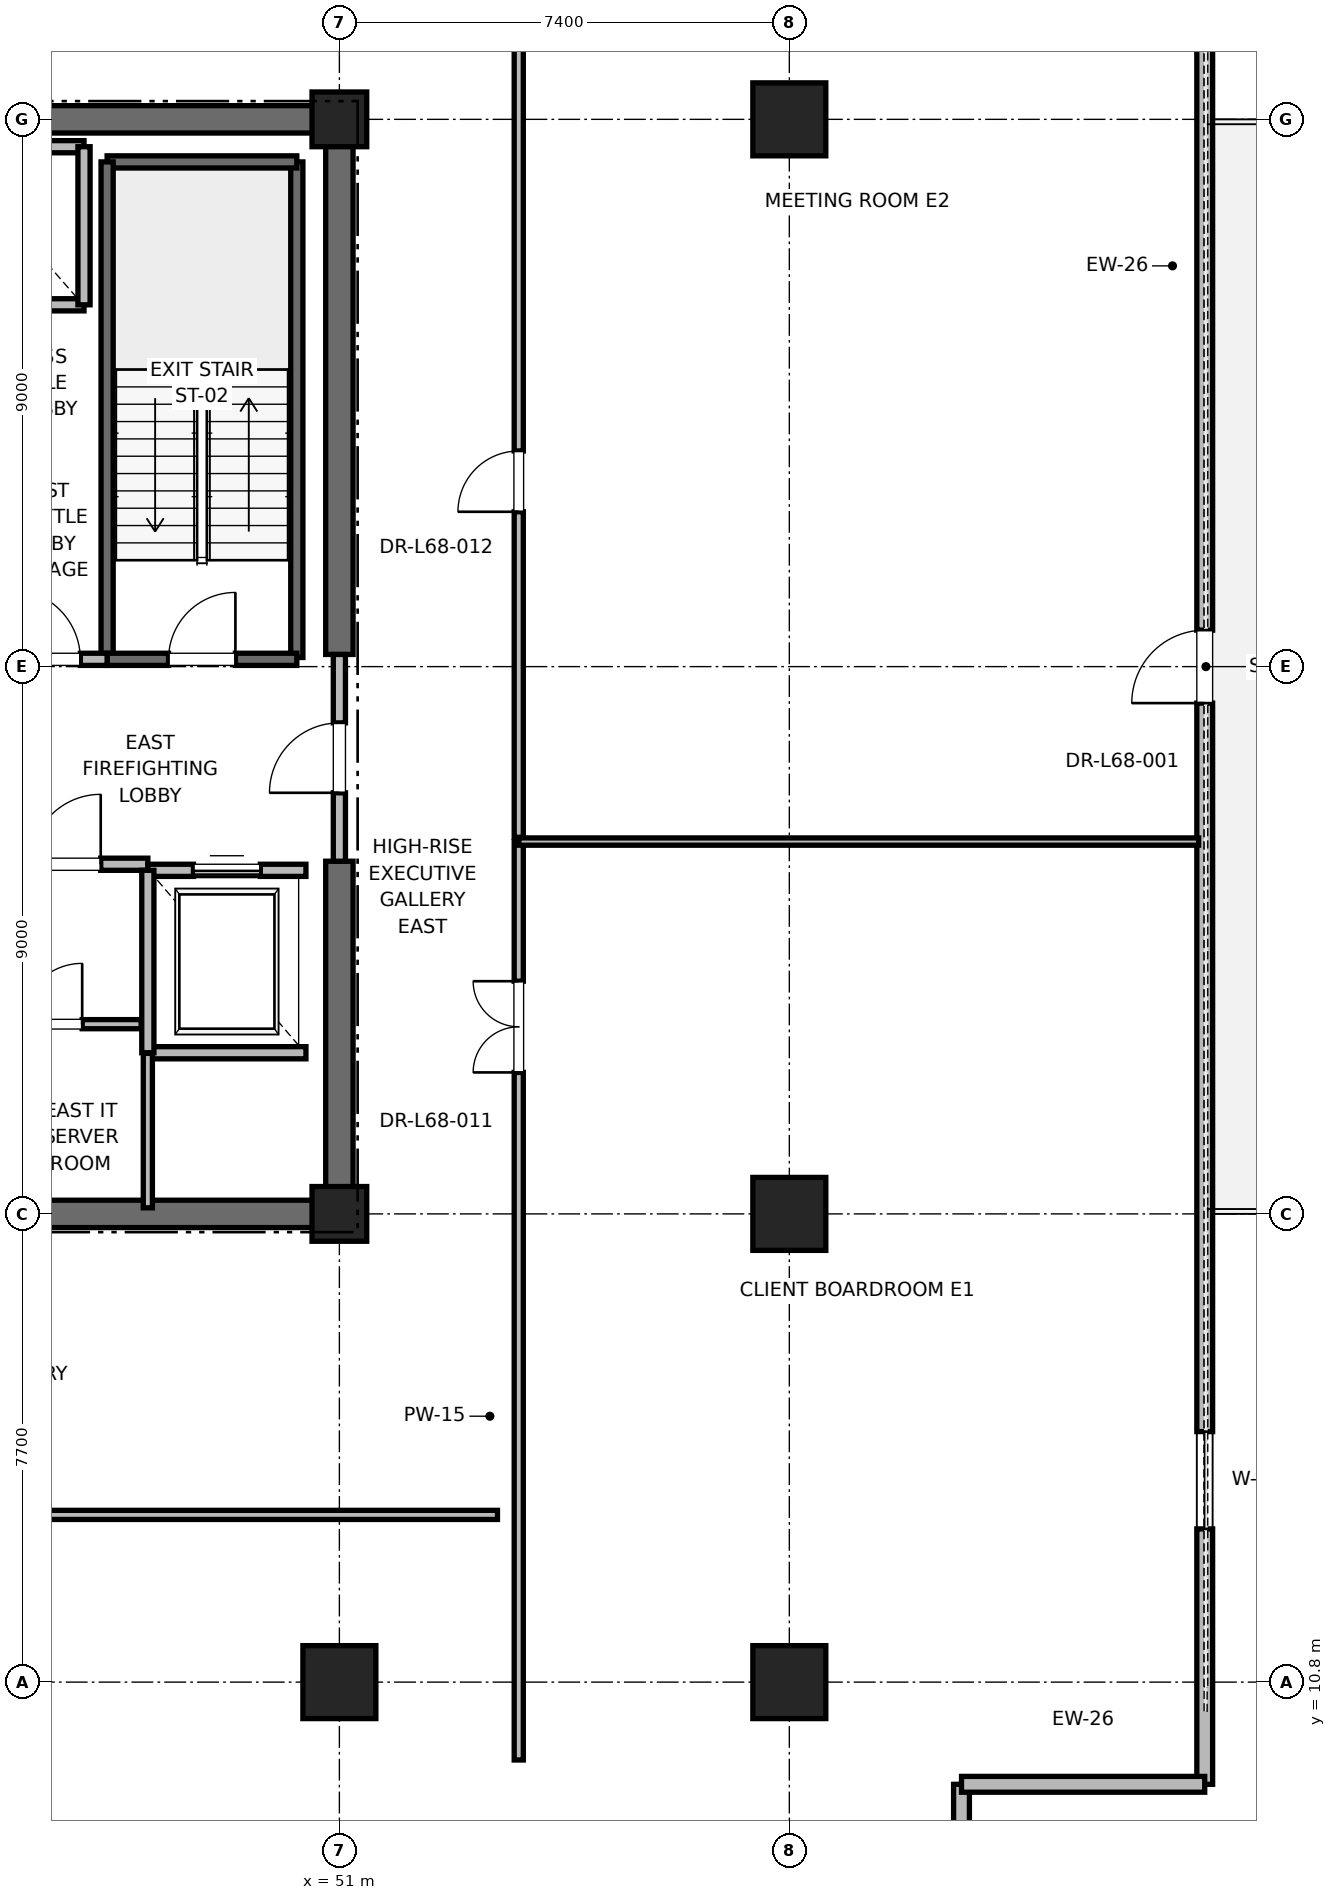
"""IFC4 building model, lengths in metres.
Left out: names, types, materials, properties, quantities, classifications, styles, units other than length and angle.
Written with IfcOpenShell. Run it as: python <this file> out.ifc"""

import sys

from ifc_helpers import new_model, si_unit, direction, frame, frame_2d, origin, origin_2d, place, context, subcontext, project, spatial, rectangle, extrude, element, fill, save


model = new_model("IFC4")
c1 = context("Model", 3, precision=1e-05, world=origin(), true_north=direction((0.0, 1.0)))
c2 = subcontext(c1, "Body", "Model", "MODEL_VIEW")
j1 = project(units=[si_unit("LENGTHUNIT", "METRE"), si_unit("PLANEANGLEUNIT", "RADIAN")], contexts=[c1])
p1 = place(None, origin())
s1 = spatial("IfcSite", under=j1, at=p1, CompositionType="ELEMENT")
p2 = place(p1, origin())
s2 = spatial("IfcBuilding", under=s1, at=p2, CompositionType="ELEMENT")
p3 = place(p2, frame((0.0, 0.0, 291.2)))
s3 = spatial("IfcBuildingStorey", under=s2, at=p3, CompositionType="ELEMENT", Elevation=291.2)
for number, where, z_axis, x_axis in (
    (1, (51.0, 10.8, 0.0), (0.0, 0.0, 1.0), (1.0, 0.0, 0.0)),
    (2, (58.4, 18.5, 0.0), (0.0, 0.0, 1.0), (1.0, 0.0, 0.0)),
    (3, (58.4, 36.5, 0.0), (0.0, 0.0, 1.0), (1.0, 0.0, 0.0)),
    (4, (58.4, 10.8, 0.0), (0.0, 0.0, 1.0), (1.0, 0.0, 0.0)),
):
    element("IfcColumn", number, at=place(p3, frame(where, z_axis=z_axis, x_axis=x_axis)), inside=s3, PredefinedType="COLUMN", context=c2, shape_type="SweptSolid", body=[
        extrude(rectangle(XDim=1.2, YDim=1.2, at=origin_2d()), origin(), (0.0, 0.0, 1.0), 4.0),
    ])
for number, where, z_axis, x_axis in (
    (5, (51.0, 18.5, 0.0), (0.0, 0.0, 1.0), (1.0, 0.0, 0.0)),
    (6, (51.0, 36.5, 0.0), (0.0, 0.0, 1.0), (1.0, 0.0, 0.0)),
):
    element("IfcColumn", number, at=place(p3, frame(where, z_axis=z_axis, x_axis=x_axis)), inside=s3, PredefinedType="PILASTER", context=c2, shape_type="SweptSolid", body=[
        extrude(rectangle(XDim=0.9, YDim=0.9, at=origin_2d()), origin(), (0.0, 0.0, 1.0), 4.0),
    ])
p4 = place(p3, frame((41.8, 18.5, 0.0), z_axis=(0.0, 0.0, 1.0), x_axis=(1.0, 0.0, 0.0)))
e7 = element("IfcWall", 7, at=p4, inside=s3, PredefinedType="SHEAR", context=c2, shape_type="SweptSolid", body=[
    extrude(rectangle(XDim=9.2, YDim=0.45, at=frame_2d((4.6, 0.0))), origin(), (0.0, 0.0, 1.0), 3.7),
])
for number, where, z_axis, x_axis in (
    (8, (45.2, 36.5, 0.0), (0.0, 0.0, 1.0), (1.0, 0.0, 0.0)),
    (9, (51.0, 18.5, 0.0), (0.0, 0.0, 1.0), (0.0, 1.0, 0.0)),
):
    element("IfcWall", number, at=place(p3, frame(where, z_axis=z_axis, x_axis=x_axis)), inside=s3, PredefinedType="SHEAR", context=c2, shape_type="SweptSolid", body=[
        extrude(rectangle(XDim=5.8, YDim=0.45, at=frame_2d((2.9, 0.0))), origin(), (0.0, 0.0, 1.0), 3.7),
    ])
p5 = place(p3, frame((51.0, 27.7, 0.0), z_axis=(0.0, 0.0, 1.0), x_axis=(0.0, 1.0, 0.0)))
e10 = element("IfcWall", 10, at=p5, inside=s3, PredefinedType="SHEAR", context=c2, shape_type="SweptSolid", body=[
    extrude(rectangle(XDim=8.8, YDim=0.45, at=frame_2d((4.4, 0.0))), origin(), (0.0, 0.0, 1.0), 3.7),
])
p6 = place(p3, frame((65.232, 9.119, 0.0), z_axis=(0.0, 0.0, 1.0), x_axis=(0.0, 1.0, 0.0)))
e11 = element("IfcWall", 11, at=p6, inside=s3, PredefinedType="PARAPET", context=c2, shape_type="SweptSolid", body=[
    extrude(rectangle(XDim=36.761, YDim=0.26, at=frame_2d((18.381, 0.0))), origin(), (0.0, 0.0, 1.0), 2.753),
])
p7 = place(p6, frame((4.2, 0.0, 0.85)))
e12 = element("IfcOpeningElement", 12, at=p7, cuts=e11, PredefinedType="OPENING", context=c2, shape_type="SweptSolid", body=[
    extrude(rectangle(XDim=1.6, YDim=2.1, at=frame_2d((0.8, 1.05))), frame((0.0, 0.13, 0.0), z_axis=(0.0, -1.0, 0.0), x_axis=(1.0, 0.0, 0.0)), (0.0, 0.0, 1.0), 0.26),
])
p8 = place(p6, frame((17.781, 0.0, 0.0)))
e13 = element("IfcOpeningElement", 13, at=p8, cuts=e11, PredefinedType="OPENING", context=c2, shape_type="SweptSolid", body=[
    extrude(rectangle(XDim=1.2, YDim=2.2, at=frame_2d((0.6, 1.1))), frame((0.0, 0.13, 0.0), z_axis=(0.0, -1.0, 0.0), x_axis=(1.0, 0.0, 0.0)), (0.0, 0.0, 1.0), 0.26),
])
p9 = place(p6, frame((30.961, 0.0, 0.85)))
e14 = element("IfcOpeningElement", 14, at=p9, cuts=e11, PredefinedType="OPENING", context=c2, shape_type="SweptSolid", body=[
    extrude(rectangle(XDim=1.6, YDim=2.1, at=frame_2d((0.8, 1.05))), frame((0.0, 0.13, 0.0), z_axis=(0.0, -1.0, 0.0), x_axis=(1.0, 0.0, 0.0)), (0.0, 0.0, 1.0), 0.26),
])
p10 = place(p3, frame((61.232, 5.619, 0.0), z_axis=(0.0, 0.0, 1.0), x_axis=(0.0, 1.0, 0.0)))
e15 = element("IfcWall", 15, at=p10, inside=s3, PredefinedType="PARAPET", context=c2, shape_type="SweptSolid", body=[
    extrude(rectangle(XDim=3.5, YDim=0.26, at=frame_2d((1.75, 0.0))), origin(), (0.0, 0.0, 1.0), 3.7),
])
p11 = place(p10, frame((0.85, 0.0, 0.85)))
e16 = element("IfcOpeningElement", 16, at=p11, cuts=e15, PredefinedType="OPENING", context=c2, shape_type="SweptSolid", body=[
    extrude(rectangle(XDim=1.8, YDim=2.2, at=frame_2d((0.9, 1.1))), frame((0.0, 0.13, 0.0), z_axis=(0.0, -1.0, 0.0), x_axis=(1.0, 0.0, 0.0)), (0.0, 0.0, 1.0), 0.26),
])
p12 = place(p3, frame((61.232, 9.119, 0.0), z_axis=(0.0, 0.0, 1.0), x_axis=(1.0, 0.0, 0.0)))
e17 = element("IfcWall", 17, at=p12, inside=s3, PredefinedType="PARAPET", context=c2, shape_type="SweptSolid", body=[
    extrude(rectangle(XDim=4.0, YDim=0.26, at=frame_2d((2.0, 0.0))), origin(), (0.0, 0.0, 1.0), 3.7),
])
p13 = place(p3, frame((50.3, 27.65, 0.0), z_axis=(0.0, 0.0, 1.0), x_axis=(0.0, 1.0, 0.0)))
e18 = element("IfcWall", 18, at=p13, inside=s3, PredefinedType="SOLIDWALL", context=c2, shape_type="SweptSolid", body=[
    extrude(rectangle(XDim=8.15, YDim=0.2, at=frame_2d((4.075, 0.0))), origin(), (0.0, 0.0, 1.0), 3.7),
])
p14 = place(p3, frame((47.18, 35.8, 0.0), z_axis=(0.0, 0.0, 1.0), x_axis=(1.0, 0.0, 0.0)))
e19 = element("IfcWall", 19, at=p14, inside=s3, PredefinedType="SOLIDWALL", context=c2, shape_type="SweptSolid", body=[
    extrude(rectangle(XDim=3.12, YDim=0.2, at=frame_2d((1.56, 0.0))), origin(), (0.0, 0.0, 1.0), 3.7),
])
p15 = place(p3, frame((47.18, 27.62, 0.0), z_axis=(0.0, 0.0, 1.0), x_axis=(0.0, 1.0, 0.0)))
e20 = element("IfcWall", 20, at=p15, inside=s3, PredefinedType="SOLIDWALL", context=c2, shape_type="SweptSolid", body=[
    extrude(rectangle(XDim=8.18, YDim=0.2, at=frame_2d((4.09, 0.0))), origin(), (0.0, 0.0, 1.0), 3.7),
])
p16 = place(p3, frame((47.18, 27.62, 0.0), z_axis=(0.0, 0.0, 1.0), x_axis=(1.0, 0.0, 0.0)))
e21 = element("IfcWall", 21, at=p16, inside=s3, PredefinedType="SOLIDWALL", context=c2, shape_type="SweptSolid", body=[
    extrude(rectangle(XDim=3.12, YDim=0.2, at=frame_2d((1.56, 0.0))), origin(), (0.0, 0.0, 1.0), 3.7),
])
p17 = place(p16, frame((1.01, 0.0, 0.0)))
e22 = element("IfcOpeningElement", 22, at=p17, cuts=e21, PredefinedType="OPENING", context=c2, shape_type="SweptSolid", body=[
    extrude(rectangle(XDim=1.1, YDim=2.15, at=frame_2d((0.55, 1.075))), frame((0.0, 0.1, 0.0), z_axis=(0.0, -1.0, 0.0), x_axis=(1.0, 0.0, 0.0)), (0.0, 0.0, 1.0), 0.2),
])
p18 = place(p3, frame((45.15, 24.25, 0.0), z_axis=(0.0, 0.0, 1.0), x_axis=(1.0, 0.0, 0.0)))
e23 = element("IfcWall", 23, at=p18, inside=s3, PredefinedType="PARTITIONING", context=c2, shape_type="SweptSolid", body=[
    extrude(rectangle(XDim=2.7, YDim=0.2, at=frame_2d((1.35, 0.0))), origin(), (0.0, 0.0, 1.0), 3.7),
])
p19 = place(p18, frame((0.775, 0.0, 0.0)))
e24 = element("IfcOpeningElement", 24, at=p19, cuts=e23, PredefinedType="OPENING", context=c2, shape_type="SweptSolid", body=[
    extrude(rectangle(XDim=1.15, YDim=2.2, at=frame_2d((0.575, 1.1))), frame((0.0, 0.1, 0.0), z_axis=(0.0, -1.0, 0.0), x_axis=(1.0, 0.0, 0.0)), (0.0, 0.0, 1.0), 0.2),
])
p20 = place(p3, frame((45.15, 27.62, 0.0), z_axis=(0.0, 0.0, 1.0), x_axis=(1.0, 0.0, 0.0)))
e25 = element("IfcWall", 25, at=p20, inside=s3, PredefinedType="PARTITIONING", context=c2, shape_type="SweptSolid", body=[
    extrude(rectangle(XDim=2.03, YDim=0.2, at=frame_2d((1.015, 0.0))), origin(), (0.0, 0.0, 1.0), 3.7),
])
p21 = place(p20, frame((0.44, 0.0, 0.0)))
e26 = element("IfcOpeningElement", 26, at=p21, cuts=e25, PredefinedType="OPENING", context=c2, shape_type="SweptSolid", body=[
    extrude(rectangle(XDim=1.15, YDim=2.2, at=frame_2d((0.575, 1.1))), frame((0.0, 0.1, 0.0), z_axis=(0.0, -1.0, 0.0), x_axis=(1.0, 0.0, 0.0)), (0.0, 0.0, 1.0), 0.2),
])
p22 = place(p3, frame((51.0, 24.3, 0.0), z_axis=(0.0, 0.0, 1.0), x_axis=(0.0, 1.0, 0.0)))
e27 = element("IfcWall", 27, at=p22, inside=s3, PredefinedType="PARTITIONING", context=c2, shape_type="SweptSolid", body=[
    extrude(rectangle(XDim=3.4, YDim=0.2, at=frame_2d((1.7, 0.0))), origin(), (0.0, 0.0, 1.0), 2.78),
])
p23 = place(p22, frame((1.125, 0.0, 0.0)))
e28 = element("IfcOpeningElement", 28, at=p23, cuts=e27, PredefinedType="OPENING", context=c2, shape_type="SweptSolid", body=[
    extrude(rectangle(XDim=1.15, YDim=2.2, at=frame_2d((0.575, 1.1))), frame((0.0, 0.1, 0.0), z_axis=(0.0, -1.0, 0.0), x_axis=(1.0, 0.0, 0.0)), (0.0, 0.0, 1.0), 0.2),
])
p24 = place(p3, frame((47.85, 21.15, 0.0), z_axis=(0.0, 0.0, 1.0), x_axis=(1.0, 0.0, 0.0)))
e29 = element("IfcWall", 29, at=p24, inside=s3, PredefinedType="SOLIDWALL", context=c2, shape_type="SweptSolid", body=[
    extrude(rectangle(XDim=2.6, YDim=0.2, at=frame_2d((1.3, 0.0))), origin(), (0.0, 0.0, 1.0), 3.7),
])
p25 = place(p3, frame((50.45, 24.15, 0.0), z_axis=(0.0, 0.0, 1.0), x_axis=(-1.0, 0.0, 0.0)))
e30 = element("IfcWall", 30, at=p25, inside=s3, PredefinedType="SOLIDWALL", context=c2, shape_type="SweptSolid", body=[
    extrude(rectangle(XDim=2.6, YDim=0.2, at=frame_2d((1.3, 0.0))), origin(), (0.0, 0.0, 1.0), 2.78),
])
p26 = place(p25, frame((0.75, 0.0, 0.0)))
e31 = element("IfcOpeningElement", 31, at=p26, cuts=e30, PredefinedType="OPENING", context=c2, shape_type="SweptSolid", body=[
    extrude(rectangle(XDim=1.1, YDim=2.2, at=frame_2d((0.55, 1.1))), frame((0.0, 0.1, 0.0), z_axis=(0.0, -1.0, 0.0), x_axis=(1.0, 0.0, 0.0)), (0.0, 0.0, 1.0), 0.2),
])
p27 = place(p3, frame((47.85, 24.15, 0.0), z_axis=(0.0, 0.0, 1.0), x_axis=(0.0, -1.0, 0.0)))
e32 = element("IfcWall", 32, at=p27, inside=s3, PredefinedType="SOLIDWALL", context=c2, shape_type="SweptSolid", body=[
    extrude(rectangle(XDim=3.0, YDim=0.2, at=frame_2d((1.5, 0.0))), origin(), (0.0, 0.0, 1.0), 3.7),
])
p28 = place(p3, frame((44.5, 33.45, 0.0), z_axis=(0.0, 0.0, 1.0), x_axis=(1.0, 0.0, 0.0)))
e33 = element("IfcWall", 33, at=p28, inside=s3, PredefinedType="SOLIDWALL", context=c2, shape_type="SweptSolid", body=[
    extrude(rectangle(XDim=2.3, YDim=0.2, at=frame_2d((1.15, 0.0))), origin(), (0.0, 0.0, 1.0), 3.7),
])
p29 = place(p3, frame((46.8, 36.05, 0.0), z_axis=(0.0, 0.0, 1.0), x_axis=(-1.0, 0.0, 0.0)))
e34 = element("IfcWall", 34, at=p29, inside=s3, PredefinedType="SOLIDWALL", context=c2, shape_type="SweptSolid", body=[
    extrude(rectangle(XDim=2.3, YDim=0.2, at=frame_2d((1.15, 0.0))), origin(), (0.0, 0.0, 1.0), 2.78),
])
p30 = place(p3, frame((46.8, 33.45, 0.0), z_axis=(0.0, 0.0, 1.0), x_axis=(0.0, 1.0, 0.0)))
e35 = element("IfcWall", 35, at=p30, inside=s3, PredefinedType="SOLIDWALL", context=c2, shape_type="SweptSolid", body=[
    extrude(rectangle(XDim=2.6, YDim=0.2, at=frame_2d((1.3, 0.0))), origin(), (0.0, 0.0, 1.0), 3.7),
])
p31 = place(p3, frame((47.85, 18.6, 0.0), z_axis=(0.0, 0.0, 1.0), x_axis=(0.0, 1.0, 0.0)))
e36 = element("IfcWall", 36, at=p31, inside=s3, PredefinedType="PARTITIONING", context=c2, shape_type="SweptSolid", body=[
    extrude(rectangle(XDim=2.54, YDim=0.15, at=frame_2d((1.27, 0.0))), origin(), (0.0, 0.0, 1.0), 2.85),
])
p32 = place(p3, frame((44.8, 21.62, 0.0), z_axis=(0.0, 0.0, 1.0), x_axis=(1.0, 0.0, 0.0)))
e37 = element("IfcWall", 37, at=p32, inside=s3, PredefinedType="PARTITIONING", context=c2, shape_type="SweptSolid", body=[
    extrude(rectangle(XDim=2.94, YDim=0.15, at=frame_2d((1.47, 0.0))), origin(), (0.0, 0.0, 1.0), 2.85),
])
p33 = place(p32, frame((0.97, 0.0, 0.0)))
e38 = element("IfcOpeningElement", 38, at=p33, cuts=e37, PredefinedType="OPENING", context=c2, shape_type="SweptSolid", body=[
    extrude(rectangle(XDim=1.0, YDim=2.15, at=frame_2d((0.5, 1.075))), frame((0.0, 0.075, 0.0), z_axis=(0.0, -1.0, 0.0), x_axis=(1.0, 0.0, 0.0)), (0.0, 0.0, 1.0), 0.15),
])
p34 = place(p3, frame((26.4, 13.55, 0.0), z_axis=(0.0, 0.0, 1.0), x_axis=(1.0, 0.0, 0.0)))
e39 = element("IfcWall", 39, at=p34, inside=s3, PredefinedType="PARTITIONING", context=c2, shape_type="SweptSolid", body=[
    extrude(rectangle(XDim=27.2, YDim=0.15, at=frame_2d((13.6, 0.0))), origin(), (0.0, 0.0, 1.0), 2.753),
])
p35 = place(p34, frame((13.1, 0.0, 0.0)))
e40 = element("IfcOpeningElement", 40, at=p35, cuts=e39, PredefinedType="OPENING", context=c2, shape_type="SweptSolid", body=[
    extrude(rectangle(XDim=1.0, YDim=2.15, at=frame_2d((0.5, 1.075))), frame((0.0, 0.075, 0.0), z_axis=(0.0, -1.0, 0.0), x_axis=(1.0, 0.0, 0.0)), (0.0, 0.0, 1.0), 0.15),
])
p36 = place(p3, frame((53.95, 9.519, 0.0), z_axis=(0.0, 0.0, 1.0), x_axis=(0.0, 1.0, 0.0)))
e41 = element("IfcWall", 41, at=p36, inside=s3, PredefinedType="PARTITIONING", context=c2, shape_type="SweptSolid", body=[
    extrude(rectangle(XDim=15.104, YDim=0.15, at=frame_2d((7.552, 0.0))), origin(), (0.0, 0.0, 1.0), 2.753),
])
p37 = place(p36, frame((11.307, 0.0, 0.0)))
e42 = element("IfcOpeningElement", 42, at=p37, cuts=e41, PredefinedType="OPENING", context=c2, shape_type="SweptSolid", body=[
    extrude(rectangle(XDim=1.5, YDim=2.25, at=frame_2d((0.75, 1.125))), frame((0.0, 0.075, 0.0), z_axis=(0.0, -1.0, 0.0), x_axis=(1.0, 0.0, 0.0)), (0.0, 0.0, 1.0), 0.15),
])
p38 = place(p3, frame((53.95, 24.623, 0.0), z_axis=(0.0, 0.0, 1.0), x_axis=(1.0, 0.0, 0.0)))
e43 = element("IfcWall", 43, at=p38, inside=s3, PredefinedType="PARTITIONING", context=c2, shape_type="SweptSolid", body=[
    extrude(rectangle(XDim=11.182, YDim=0.12, at=frame_2d((5.591, 0.0))), origin(), (0.0, 0.0, 1.0), 2.753),
])
p39 = place(p3, frame((53.95, 24.693, 0.0), z_axis=(0.0, 0.0, 1.0), x_axis=(0.0, 1.0, 0.0)))
e44 = element("IfcWall", 44, at=p39, inside=s3, PredefinedType="PARTITIONING", context=c2, shape_type="SweptSolid", body=[
    extrude(rectangle(XDim=20.788, YDim=0.15, at=frame_2d((10.394, 0.0))), origin(), (0.0, 0.0, 1.0), 2.753),
])
p40 = place(p39, frame((5.354, 0.0, 0.0)))
e45 = element("IfcOpeningElement", 45, at=p40, cuts=e44, PredefinedType="OPENING", context=c2, shape_type="SweptSolid", body=[
    extrude(rectangle(XDim=1.0, YDim=2.15, at=frame_2d((0.5, 1.075))), frame((0.0, 0.075, 0.0), z_axis=(0.0, -1.0, 0.0), x_axis=(1.0, 0.0, 0.0)), (0.0, 0.0, 1.0), 0.15),
])
p41 = place(p7, origin())
e46 = element("IfcWindow", 46, at=p41, inside=s3, PartitioningType="SINGLE_PANEL", PredefinedType="WINDOW", context=c2, shape_type="SweptSolid", body=[
    extrude(rectangle(XDim=1.6, YDim=2.1, at=frame_2d((0.8, 1.05))), frame((0.0, 0.03, 0.0), z_axis=(0.0, -1.0, 0.0), x_axis=(1.0, 0.0, 0.0)), (0.0, 0.0, 1.0), 0.06),
])
fill(e12, e46)
p42 = place(p8, origin())
e47 = element("IfcDoor", 47, at=p42, inside=s3, OperationType="SINGLE_SWING_LEFT", PredefinedType="DOOR", context=c2, shape_type="SweptSolid", body=[
    extrude(rectangle(XDim=1.2, YDim=2.2, at=frame_2d((0.6, 1.1))), frame((0.0, 0.025, 0.0), z_axis=(0.0, -1.0, 0.0), x_axis=(1.0, 0.0, 0.0)), (0.0, 0.0, 1.0), 0.05),
])
fill(e13, e47)
p43 = place(p17, origin())
e48 = element("IfcDoor", 48, at=p43, inside=s3, OperationType="SINGLE_SWING_RIGHT", PredefinedType="DOOR", context=c2, shape_type="SweptSolid", body=[
    extrude(rectangle(XDim=1.1, YDim=2.15, at=frame_2d((0.55, 1.075))), frame((0.0, 0.025, 0.0), z_axis=(0.0, -1.0, 0.0), x_axis=(1.0, 0.0, 0.0)), (0.0, 0.0, 1.0), 0.05),
])
fill(e22, e48)
p44 = place(p19, origin())
e49 = element("IfcDoor", 49, at=p44, inside=s3, OperationType="SINGLE_SWING_RIGHT", PredefinedType="DOOR", context=c2, shape_type="SweptSolid", body=[
    extrude(rectangle(XDim=1.15, YDim=2.2, at=frame_2d((0.575, 1.1))), frame((0.0, 0.025, 0.0), z_axis=(0.0, -1.0, 0.0), x_axis=(1.0, 0.0, 0.0)), (0.0, 0.0, 1.0), 0.05),
])
fill(e24, e49)
p45 = place(p21, origin())
e50 = element("IfcDoor", 50, at=p45, inside=s3, OperationType="SINGLE_SWING_LEFT", PredefinedType="DOOR", context=c2, shape_type="SweptSolid", body=[
    extrude(rectangle(XDim=1.15, YDim=2.2, at=frame_2d((0.575, 1.1))), frame((0.0, 0.025, 0.0), z_axis=(0.0, -1.0, 0.0), x_axis=(1.0, 0.0, 0.0)), (0.0, 0.0, 1.0), 0.05),
])
fill(e26, e50)
p46 = place(p23, origin())
e51 = element("IfcDoor", 51, at=p46, inside=s3, OperationType="SINGLE_SWING_LEFT", PredefinedType="DOOR", context=c2, shape_type="SweptSolid", body=[
    extrude(rectangle(XDim=1.15, YDim=2.2, at=frame_2d((0.575, 1.1))), frame((0.0, 0.025, 0.0), z_axis=(0.0, -1.0, 0.0), x_axis=(1.0, 0.0, 0.0)), (0.0, 0.0, 1.0), 0.05),
])
fill(e28, e51)
p47 = place(p26, origin())
e52 = element("IfcDoor", 52, at=p47, inside=s3, OperationType="SLIDING_TO_RIGHT", PredefinedType="DOOR", context=c2, shape_type="SweptSolid", body=[
    extrude(rectangle(XDim=1.1, YDim=2.2, at=frame_2d((0.55, 1.1))), frame((0.0, 0.025, 0.0), z_axis=(0.0, -1.0, 0.0), x_axis=(1.0, 0.0, 0.0)), (0.0, 0.0, 1.0), 0.05),
])
fill(e31, e52)
p48 = place(p33, origin())
e53 = element("IfcDoor", 53, at=p48, inside=s3, OperationType="SINGLE_SWING_RIGHT", PredefinedType="DOOR", context=c2, shape_type="SweptSolid", body=[
    extrude(rectangle(XDim=1.0, YDim=2.15, at=frame_2d((0.5, 1.075))), frame((0.0, 0.025, 0.0), z_axis=(0.0, -1.0, 0.0), x_axis=(1.0, 0.0, 0.0)), (0.0, 0.0, 1.0), 0.05),
])
fill(e38, e53)
p49 = place(p37, origin())
e54 = element("IfcDoor", 54, at=p49, inside=s3, OperationType="DOUBLE_DOOR_SINGLE_SWING", PredefinedType="DOOR", context=c2, shape_type="SweptSolid", body=[
    extrude(rectangle(XDim=1.5, YDim=2.25, at=frame_2d((0.75, 1.125))), frame((0.0, 0.025, 0.0), z_axis=(0.0, -1.0, 0.0), x_axis=(1.0, 0.0, 0.0)), (0.0, 0.0, 1.0), 0.05),
])
fill(e42, e54)
p50 = place(p40, origin())
e55 = element("IfcDoor", 55, at=p50, inside=s3, OperationType="SINGLE_SWING_LEFT", PredefinedType="DOOR", context=c2, shape_type="SweptSolid", body=[
    extrude(rectangle(XDim=1.0, YDim=2.15, at=frame_2d((0.5, 1.075))), frame((0.0, 0.025, 0.0), z_axis=(0.0, -1.0, 0.0), x_axis=(1.0, 0.0, 0.0)), (0.0, 0.0, 1.0), 0.05),
])
fill(e45, e55)
save(model, sys.argv[1])
